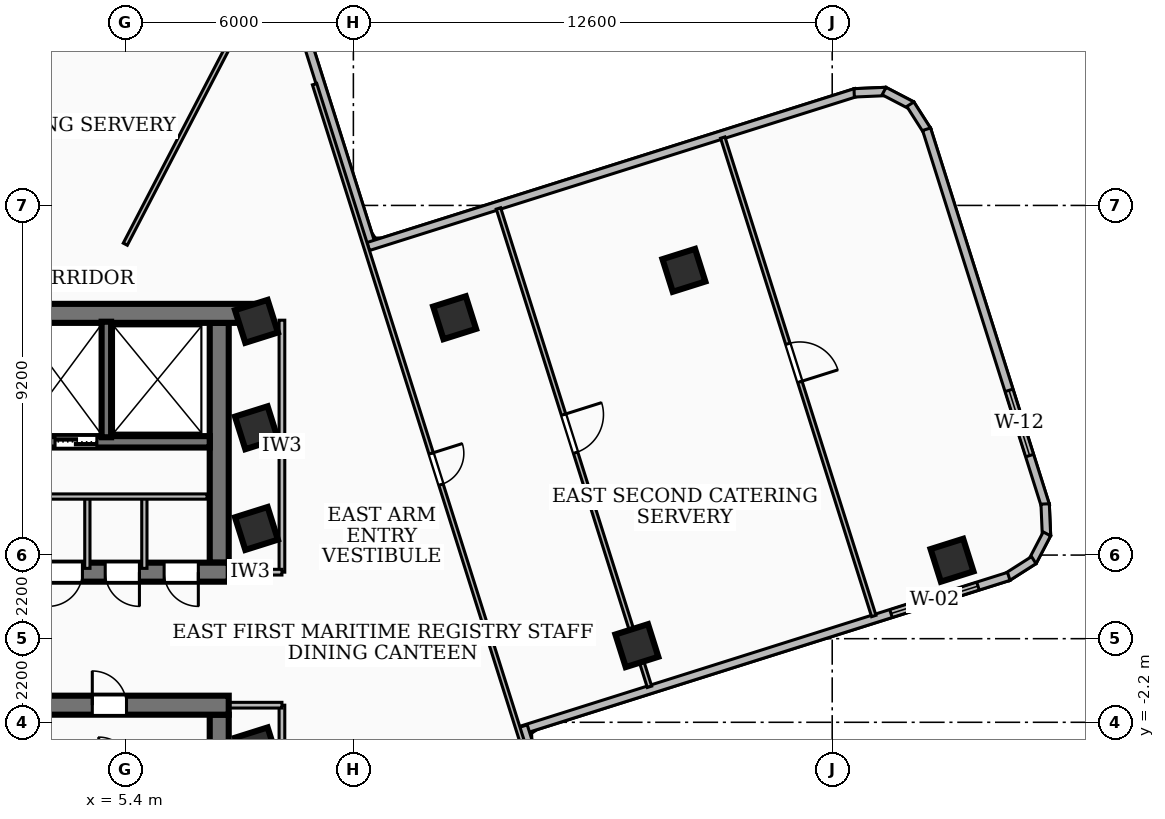
"""IFC4 building model, lengths in metres.
Left out: names, types, materials, properties, quantities, classifications, styles, units other than length and angle.
Written with IfcOpenShell. Run it as: python <this file> out.ifc"""

import sys

from ifc_helpers import new_model, si_unit, direction, frame, frame_2d, origin, origin_2d, place, context, subcontext, project, spatial, rectangle, extrude, element, fill, save


model = new_model("IFC4")
c1 = context("Model", 3, precision=1e-05, world=origin(), true_north=direction((0.0, 1.0)))
c2 = subcontext(c1, "Body", "Model", "MODEL_VIEW")
j1 = project(units=[si_unit("LENGTHUNIT", "METRE"), si_unit("PLANEANGLEUNIT", "RADIAN")], contexts=[c1])
p1 = place(None, origin())
s1 = spatial("IfcSite", under=j1, at=p1, CompositionType="ELEMENT")
p2 = place(p1, origin())
s2 = spatial("IfcBuilding", under=s1, at=p2, CompositionType="ELEMENT")
p3 = place(p2, frame((0.0, 0.0, 152.28)))
s3 = spatial("IfcBuildingStorey", under=s2, at=p3, CompositionType="ELEMENT", Elevation=152.28)
p4 = place(p3, frame((-8.78, 8.56, 0.0), z_axis=(0.0, 0.0, 1.0), x_axis=(1.0, 0.0, 0.0)))
e1 = element("IfcWall", 1, at=p4, inside=s3, PredefinedType="SHEAR", context=c2, shape_type="SweptSolid", body=[
    extrude(rectangle(XDim=17.56, YDim=0.5, at=frame_2d((8.78, 0.0))), origin(), (0.0, 0.0, 1.0), 3.34),
])
p5 = place(p3, frame((8.12, 1.75, 0.0), z_axis=(0.0, 0.0, 1.0), x_axis=(-1.0, 0.0, 0.0)))
e2 = element("IfcWall", 2, at=p5, inside=s3, PredefinedType="SHEAR", context=c2, shape_type="SweptSolid", body=[
    extrude(rectangle(XDim=16.24, YDim=0.5, at=frame_2d((8.12, 0.0))), origin(), (0.0, 0.0, 1.0), 3.34),
])
p6 = place(p5, frame((7.45, 0.0, 0.0)))
e3 = element("IfcOpeningElement", 3, at=p6, cuts=e2, PredefinedType="OPENING", context=c2, shape_type="SweptSolid", body=[
    extrude(rectangle(XDim=1.0, YDim=2.1, at=frame_2d((0.5, 1.05))), frame((0.0, 0.26, 0.0), z_axis=(0.0, -1.0, 0.0), x_axis=(1.0, 0.0, 0.0)), (0.0, 0.0, 1.0), 0.52),
])
p7 = place(p5, frame((3.85, 0.0, 0.0)))
e4 = element("IfcOpeningElement", 4, at=p7, cuts=e2, PredefinedType="OPENING", context=c2, shape_type="SweptSolid", body=[
    extrude(rectangle(XDim=0.9, YDim=2.06, at=frame_2d((0.45, 1.03))), frame((0.0, 0.26, 0.0), z_axis=(0.0, -1.0, 0.0), x_axis=(1.0, 0.0, 0.0)), (0.0, 0.0, 1.0), 0.52),
])
p8 = place(p5, frame((2.35, 0.0, 0.0)))
e5 = element("IfcOpeningElement", 5, at=p8, cuts=e2, PredefinedType="OPENING", context=c2, shape_type="SweptSolid", body=[
    extrude(rectangle(XDim=0.9, YDim=2.06, at=frame_2d((0.45, 1.03))), frame((0.0, 0.26, 0.0), z_axis=(0.0, -1.0, 0.0), x_axis=(1.0, 0.0, 0.0)), (0.0, 0.0, 1.0), 0.52),
])
p9 = place(p5, frame((0.8, 0.0, 0.0)))
e6 = element("IfcOpeningElement", 6, at=p9, cuts=e2, PredefinedType="OPENING", context=c2, shape_type="SweptSolid", body=[
    extrude(rectangle(XDim=0.9, YDim=2.06, at=frame_2d((0.45, 1.03))), frame((0.0, 0.26, 0.0), z_axis=(0.0, -1.0, 0.0), x_axis=(1.0, 0.0, 0.0)), (0.0, 0.0, 1.0), 0.52),
])
p10 = place(p3, frame((7.87, 8.31, 0.0), z_axis=(0.0, 0.0, 1.0), x_axis=(0.0, -1.0, 0.0)))
e7 = element("IfcWall", 7, at=p10, inside=s3, PredefinedType="SHEAR", context=c2, shape_type="SweptSolid", body=[
    extrude(rectangle(XDim=6.31, YDim=0.5, at=frame_2d((3.155, 0.0))), origin(), (0.0, 0.0, 1.0), 3.34),
])
p11 = place(p3, frame((7.62, 5.18, 0.0), z_axis=(0.0, 0.0, 1.0), x_axis=(-1.0, 0.0, 0.0)))
e8 = element("IfcWall", 8, at=p11, inside=s3, PredefinedType="SOLIDWALL", context=c2, shape_type="SweptSolid", body=[
    extrude(rectangle(XDim=15.24, YDim=0.3, at=frame_2d((7.62, 0.0))), origin(), (0.0, 0.0, 1.0), 3.34),
])
p12 = place(p11, frame((5.77, 0.0, 0.0)))
e9 = element("IfcOpeningElement", 9, at=p12, cuts=e8, PredefinedType="OPENING", context=c2, shape_type="SweptSolid", body=[
    extrude(rectangle(XDim=1.1, YDim=2.15, at=frame_2d((0.55, 1.075))), frame((0.0, 0.16, 0.0), z_axis=(0.0, -1.0, 0.0), x_axis=(1.0, 0.0, 0.0)), (0.0, 0.0, 1.0), 0.32),
])
p13 = place(p11, frame((2.97, 0.0, 0.0)))
e10 = element("IfcOpeningElement", 10, at=p13, cuts=e8, PredefinedType="OPENING", context=c2, shape_type="SweptSolid", body=[
    extrude(rectangle(XDim=1.1, YDim=2.15, at=frame_2d((0.55, 1.075))), frame((0.0, 0.16, 0.0), z_axis=(0.0, -1.0, 0.0), x_axis=(1.0, 0.0, 0.0)), (0.0, 0.0, 1.0), 0.32),
])
p14 = place(p11, frame((7.97, 0.0, 0.0)))
e11 = element("IfcOpeningElement", 11, at=p14, cuts=e8, PredefinedType="OPENING", context=c2, shape_type="SweptSolid", body=[
    extrude(rectangle(XDim=1.0, YDim=2.1, at=frame_2d((0.5, 1.05))), frame((0.0, 0.16, 0.0), z_axis=(0.0, -1.0, 0.0), x_axis=(1.0, 0.0, 0.0)), (0.0, 0.0, 1.0), 0.32),
])
p15 = place(p3, frame((-8.12, -1.75, 0.0), z_axis=(0.0, 0.0, 1.0), x_axis=(1.0, 0.0, 0.0)))
e12 = element("IfcWall", 12, at=p15, inside=s3, PredefinedType="SHEAR", context=c2, shape_type="SweptSolid", body=[
    extrude(rectangle(XDim=16.24, YDim=0.5, at=frame_2d((8.12, 0.0))), origin(), (0.0, 0.0, 1.0), 3.34),
])
p16 = place(p15, frame((7.45, 0.0, 0.0)))
e13 = element("IfcOpeningElement", 13, at=p16, cuts=e12, PredefinedType="OPENING", context=c2, shape_type="SweptSolid", body=[
    extrude(rectangle(XDim=1.0, YDim=2.1, at=frame_2d((0.5, 1.05))), frame((0.0, 0.26, 0.0), z_axis=(0.0, -1.0, 0.0), x_axis=(1.0, 0.0, 0.0)), (0.0, 0.0, 1.0), 0.52),
])
p17 = place(p15, frame((12.65, 0.0, 0.0)))
e14 = element("IfcOpeningElement", 14, at=p17, cuts=e12, PredefinedType="OPENING", context=c2, shape_type="SweptSolid", body=[
    extrude(rectangle(XDim=0.9, YDim=2.06, at=frame_2d((0.45, 1.03))), frame((0.0, 0.26, 0.0), z_axis=(0.0, -1.0, 0.0), x_axis=(1.0, 0.0, 0.0)), (0.0, 0.0, 1.0), 0.52),
])
p18 = place(p15, frame((0.565, 0.0, 0.0)))
e15 = element("IfcOpeningElement", 15, at=p18, cuts=e12, PredefinedType="OPENING", context=c2, shape_type="SweptSolid", body=[
    extrude(rectangle(XDim=1.05, YDim=2.15, at=frame_2d((0.525, 1.075))), frame((0.0, 0.26, 0.0), z_axis=(0.0, -1.0, 0.0), x_axis=(1.0, 0.0, 0.0)), (0.0, 0.0, 1.0), 0.52),
])
p19 = place(p15, frame((2.125, 0.0, 0.0)))
e16 = element("IfcOpeningElement", 16, at=p19, cuts=e12, PredefinedType="OPENING", context=c2, shape_type="SweptSolid", body=[
    extrude(rectangle(XDim=1.05, YDim=2.15, at=frame_2d((0.525, 1.075))), frame((0.0, 0.26, 0.0), z_axis=(0.0, -1.0, 0.0), x_axis=(1.0, 0.0, 0.0)), (0.0, 0.0, 1.0), 0.52),
])
p20 = place(p15, frame((3.685, 0.0, 0.0)))
e17 = element("IfcOpeningElement", 17, at=p20, cuts=e12, PredefinedType="OPENING", context=c2, shape_type="SweptSolid", body=[
    extrude(rectangle(XDim=1.05, YDim=2.15, at=frame_2d((0.525, 1.075))), frame((0.0, 0.26, 0.0), z_axis=(0.0, -1.0, 0.0), x_axis=(1.0, 0.0, 0.0)), (0.0, 0.0, 1.0), 0.52),
])
p21 = place(p3, frame((7.87, -2.0, 0.0), z_axis=(0.0, 0.0, 1.0), x_axis=(0.0, -1.0, 0.0)))
e18 = element("IfcWall", 18, at=p21, inside=s3, PredefinedType="SHEAR", context=c2, shape_type="SweptSolid", body=[
    extrude(rectangle(XDim=6.31, YDim=0.5, at=frame_2d((3.155, 0.0))), origin(), (0.0, 0.0, 1.0), 3.34),
])
p22 = place(p3, frame((4.9, 5.3, 0.0), z_axis=(0.0, 0.0, 1.0), x_axis=(0.0, 1.0, 0.0)))
e19 = element("IfcWall", 19, at=p22, inside=s3, PredefinedType="SOLIDWALL", context=c2, shape_type="SweptSolid", body=[
    extrude(rectangle(XDim=3.04, YDim=0.25, at=frame_2d((1.52, 0.0))), origin(), (0.0, 0.0, 1.0), 3.34),
])
for number, where, z_axis, x_axis in (
    (20, (8.85, -2.9, 0.0), (0.0, 0.0, 1.0), (0.954, 0.301, 0.0)),
    (21, (8.85, 2.9, 0.0), (0.0, 0.0, 1.0), (0.954, 0.301, 0.0)),
    (22, (8.85, 5.55, 0.0), (0.0, 0.0, 1.0), (0.954, 0.301, 0.0)),
    (23, (8.85, 8.35, 0.0), (0.0, 0.0, 1.0), (0.954, 0.301, 0.0)),
    (24, (18.86, -0.183, 0.0), (0.0, 0.0, 1.0), (0.954, 0.301, 0.0)),
    (25, (14.064, 8.445, 0.0), (0.0, 0.0, 1.0), (0.954, 0.301, 0.0)),
    (26, (27.153, 2.064, 0.0), (0.0, 0.0, 1.0), (0.954, 0.301, 0.0)),
    (27, (20.098, 9.692, 0.0), (0.0, 0.0, 1.0), (0.954, 0.301, 0.0)),
):
    element("IfcColumn", number, at=place(p3, frame(where, z_axis=z_axis, x_axis=x_axis)), inside=s3, PredefinedType="COLUMN", context=c2, shape_type="SweptSolid", body=[
        extrude(rectangle(XDim=0.9, YDim=0.9, at=origin_2d()), origin(), (0.0, 0.0, 1.0), 3.6),
    ])
p23 = place(p3, frame((9.868, 16.706, 0.0), z_axis=(0.0, 0.0, 1.0), x_axis=(0.300982683852, -0.953629605256, 0.0)))
e28 = element("IfcWall", 28, at=p23, inside=s3, PredefinedType="SOLIDWALL", context=c2, shape_type="SweptSolid", body=[
    extrude(rectangle(XDim=6.759, YDim=0.22, at=frame_2d((3.379, 0.0))), origin(), (0.0, 0.0, 1.0), 2.152),
])
p24 = place(p3, frame((11.792, 10.319, 0.0), z_axis=(0.0, 0.0, 1.0), x_axis=(0.953607060649, 0.301054104573, 0.0)))
e29 = element("IfcWall", 29, at=p24, inside=s3, PredefinedType="SOLIDWALL", context=c2, shape_type="SweptSolid", body=[
    extrude(rectangle(XDim=13.459, YDim=0.22, at=frame_2d((6.73, 0.0))), origin(), (0.0, 0.0, 1.0), 2.152),
])
p25 = place(p3, frame((24.578, 14.362, 0.0), z_axis=(0.0, 0.0, 1.0), x_axis=(0.999075913973, 0.042980438793, 0.0)))
e30 = element("IfcWall", 30, at=p25, inside=s3, PredefinedType="SOLIDWALL", context=c2, shape_type="SweptSolid", body=[
    extrude(rectangle(XDim=0.835, YDim=0.22, at=frame_2d((0.417, 0.0))), origin(), (0.0, 0.0, 1.0), 3.34),
])
p26 = place(p3, frame((25.365, 14.409, 0.0), z_axis=(0.0, 0.0, 1.0), x_axis=(0.886542320322, -0.462647505427, 0.0)))
e31 = element("IfcWall", 31, at=p26, inside=s3, PredefinedType="SOLIDWALL", context=c2, shape_type="SweptSolid", body=[
    extrude(rectangle(XDim=0.819, YDim=0.22, at=frame_2d((0.41, 0.0))), origin(), (0.0, 0.0, 1.0), 3.34),
])
p27 = place(p3, frame((26.056, 14.063, 0.0), z_axis=(0.0, 0.0, 1.0), x_axis=(0.537481840432, -0.843275323489, 0.0)))
e32 = element("IfcWall", 32, at=p27, inside=s3, PredefinedType="SOLIDWALL", context=c2, shape_type="SweptSolid", body=[
    extrude(rectangle(XDim=0.833, YDim=0.22, at=frame_2d((0.417, 0.0))), origin(), (0.0, 0.0, 1.0), 3.34),
])
p28 = place(p3, frame((26.483, 13.405, 0.0), z_axis=(0.0, 0.0, 1.0), x_axis=(0.301132492372, -0.953582310049, 0.0)))
e33 = element("IfcWall", 33, at=p28, inside=s3, PredefinedType="SOLIDWALL", context=c2, shape_type="SweptSolid", body=[
    extrude(rectangle(XDim=10.391, YDim=0.22, at=frame_2d((5.196, 0.0))), origin(), (0.0, 0.0, 1.0), 3.34),
])
p29 = place(p28, frame((7.205, 0.0, 0.85)))
e34 = element("IfcOpeningElement", 34, at=p29, cuts=e33, PredefinedType="OPENING", context=c2, shape_type="SweptSolid", body=[
    extrude(rectangle(XDim=1.8, YDim=1.6, at=frame_2d((0.9, 0.8))), frame((0.0, 0.12, 0.0), z_axis=(0.0, -1.0, 0.0), x_axis=(1.0, 0.0, 0.0)), (0.0, 0.0, 1.0), 0.24),
])
p30 = place(p3, frame((29.603, 3.545, 0.0), z_axis=(0.0, 0.0, 1.0), x_axis=(0.042992997635, -0.99907537361, 0.0)))
e35 = element("IfcWall", 35, at=p30, inside=s3, PredefinedType="SOLIDWALL", context=c2, shape_type="SweptSolid", body=[
    extrude(rectangle(XDim=0.835, YDim=0.22, at=frame_2d((0.417, 0.0))), origin(), (0.0, 0.0, 1.0), 3.34),
])
p31 = place(p3, frame((29.65, 2.758, 0.0), z_axis=(0.0, 0.0, 1.0), x_axis=(-0.462647505427, -0.886542320322, 0.0)))
e36 = element("IfcWall", 36, at=p31, inside=s3, PredefinedType="SOLIDWALL", context=c2, shape_type="SweptSolid", body=[
    extrude(rectangle(XDim=0.819, YDim=0.22, at=frame_2d((0.41, 0.0))), origin(), (0.0, 0.0, 1.0), 3.34),
])
p32 = place(p3, frame((29.304, 2.067, 0.0), z_axis=(0.0, 0.0, 1.0), x_axis=(-0.843275323489, -0.537481840432, 0.0)))
e37 = element("IfcWall", 37, at=p32, inside=s3, PredefinedType="SOLIDWALL", context=c2, shape_type="SweptSolid", body=[
    extrude(rectangle(XDim=0.833, YDim=0.22, at=frame_2d((0.417, 0.0))), origin(), (0.0, 0.0, 1.0), 3.34),
])
p33 = place(p3, frame((28.646, 1.64, 0.0), z_axis=(0.0, 0.0, 1.0), x_axis=(-0.953626521982, -0.300992452685, 0.0)))
e38 = element("IfcWall", 38, at=p33, inside=s3, PredefinedType="SOLIDWALL", context=c2, shape_type="SweptSolid", body=[
    extrude(rectangle(XDim=13.458, YDim=0.22, at=frame_2d((6.729, 0.0))), origin(), (0.0, 0.0, 1.0), 3.34),
])
p34 = place(p33, frame((0.85, 0.0, 0.85)))
e39 = element("IfcOpeningElement", 39, at=p34, cuts=e38, PredefinedType="OPENING", context=c2, shape_type="SweptSolid", body=[
    extrude(rectangle(XDim=2.4, YDim=2.1, at=frame_2d((1.2, 1.05))), frame((0.0, 0.12, 0.0), z_axis=(0.0, -1.0, 0.0), x_axis=(1.0, 0.0, 0.0)), (0.0, 0.0, 1.0), 0.24),
])
p35 = place(p3, frame((15.87, -2.301, 0.0), z_axis=(0.0, 0.0, 1.0), x_axis=(0.300910882413, -0.953652264112, 0.0)))
e40 = element("IfcWall", 40, at=p35, inside=s3, PredefinedType="SOLIDWALL", context=c2, shape_type="SweptSolid", body=[
    extrude(rectangle(XDim=5.989, YDim=0.22, at=frame_2d((2.994, 0.0))), origin(), (0.0, 0.0, 1.0), 3.34),
])
p36 = place(p3, frame((2.9, 3.74, 0.0), z_axis=(0.0, 0.0, 1.0), x_axis=(1.0, 0.0, 0.0)))
e41 = element("IfcWall", 41, at=p36, inside=s3, PredefinedType="PARTITIONING", context=c2, shape_type="SweptSolid", body=[
    extrude(rectangle(XDim=4.65, YDim=0.138, at=frame_2d((2.325, 0.0))), origin(), (0.0, 0.0, 1.0), 3.34),
])
for number, where, z_axis, x_axis in (
    (42, (4.4, 1.85, 0.0), (0.0, 0.0, 1.0), (0.0, 1.0, 0.0)),
    (43, (5.9, 1.85, 0.0), (0.0, 0.0, 1.0), (0.0, 1.0, 0.0)),
):
    element("IfcWall", number, at=place(p3, frame(where, z_axis=z_axis, x_axis=x_axis)), inside=s3, PredefinedType="PARTITIONING", context=c2, shape_type="SweptSolid", body=[
        extrude(rectangle(XDim=1.89, YDim=0.138, at=frame_2d((0.945, 0.0))), origin(), (0.0, 0.0, 1.0), 2.57),
    ])
p37 = place(p3, frame((9.52, 1.75, 0.0), z_axis=(0.0, 0.0, 1.0), x_axis=(0.0, 1.0, 0.0)))
e44 = element("IfcWall", 44, at=p37, inside=s3, PredefinedType="PARTITIONING", context=c2, shape_type="SweptSolid", body=[
    extrude(rectangle(XDim=6.63, YDim=0.15, at=frame_2d((3.315, 0.0))), origin(), (0.0, 0.0, 1.0), 2.152),
])
p38 = place(p3, frame((7.85, 1.75, 0.0), z_axis=(0.0, 0.0, 1.0), x_axis=(1.0, 0.0, 0.0)))
e45 = element("IfcWall", 45, at=p38, inside=s3, PredefinedType="PARTITIONING", context=c2, shape_type="SweptSolid", body=[
    extrude(rectangle(XDim=1.67, YDim=0.15, at=frame_2d((0.835, 0.0))), origin(), (0.0, 0.0, 1.0), 2.57),
])
p39 = place(p3, frame((9.52, -8.38, 0.0), z_axis=(0.0, 0.0, 1.0), x_axis=(0.0, 1.0, 0.0)))
e46 = element("IfcWall", 46, at=p39, inside=s3, PredefinedType="PARTITIONING", context=c2, shape_type="SweptSolid", body=[
    extrude(rectangle(XDim=6.63, YDim=0.15, at=frame_2d((3.315, 0.0))), origin(), (0.0, 0.0, 1.0), 2.152),
])
p40 = place(p3, frame((7.85, -1.75, 0.0), z_axis=(0.0, 0.0, 1.0), x_axis=(1.0, 0.0, 0.0)))
e47 = element("IfcWall", 47, at=p40, inside=s3, PredefinedType="PARTITIONING", context=c2, shape_type="SweptSolid", body=[
    extrude(rectangle(XDim=1.67, YDim=0.15, at=frame_2d((0.835, 0.0))), origin(), (0.0, 0.0, 1.0), 2.57),
])
p41 = place(p3, frame((5.398, 10.38, 0.0), z_axis=(0.0, 0.0, 1.0), x_axis=(0.461434665806, 0.887174193263, 0.0)))
e48 = element("IfcWall", 48, at=p41, inside=s3, PredefinedType="PARTITIONING", context=c2, shape_type="SweptSolid", body=[
    extrude(rectangle(XDim=7.975, YDim=0.12, at=frame_2d((3.988, 0.0))), origin(), (0.0, 0.0, 1.0), 2.152),
])
p42 = place(p3, frame((10.379, 14.591, 0.0), z_axis=(0.0, 0.0, 1.0), x_axis=(0.301070726534, -0.95360181293, 0.0)))
e49 = element("IfcWall", 49, at=p42, inside=s3, PredefinedType="PARTITIONING", context=c2, shape_type="SweptSolid", body=[
    extrude(rectangle(XDim=20.81, YDim=0.12, at=frame_2d((10.405, 0.0))), origin(), (0.0, 0.0, 1.0), 2.152),
])
p43 = place(p42, frame((10.189, 0.0, 0.0)))
e50 = element("IfcOpeningElement", 50, at=p43, cuts=e49, PredefinedType="OPENING", context=c2, shape_type="SweptSolid", body=[
    extrude(rectangle(XDim=0.86, YDim=2.0, at=frame_2d((0.43, 1.0))), frame((0.0, 0.07, 0.0), z_axis=(0.0, -1.0, 0.0), x_axis=(1.0, 0.0, 0.0)), (0.0, 0.0, 1.0), 0.14),
])
p44 = place(p3, frame((15.218, 11.321, 0.0), z_axis=(0.0, 0.0, 1.0), x_axis=(0.301061435932, -0.953604746105, 0.0)))
e51 = element("IfcWall", 51, at=p44, inside=s3, PredefinedType="PARTITIONING", context=c2, shape_type="SweptSolid", body=[
    extrude(rectangle(XDim=13.199, YDim=0.12, at=frame_2d((6.6, 0.0))), origin(), (0.0, 0.0, 1.0), 2.152),
])
p45 = place(p44, frame((5.69, 0.0, 0.0)))
e52 = element("IfcOpeningElement", 52, at=p45, cuts=e51, PredefinedType="OPENING", context=c2, shape_type="SweptSolid", body=[
    extrude(rectangle(XDim=1.05, YDim=2.08, at=frame_2d((0.525, 1.04))), frame((0.0, 0.07, 0.0), z_axis=(0.0, -1.0, 0.0), x_axis=(1.0, 0.0, 0.0)), (0.0, 0.0, 1.0), 0.14),
])
p46 = place(p3, frame((21.12, 13.185, 0.0), z_axis=(0.0, 0.0, 1.0), x_axis=(0.301040196878, -0.953611451202, 0.0)))
e53 = element("IfcWall", 53, at=p46, inside=s3, PredefinedType="PARTITIONING", context=c2, shape_type="SweptSolid", body=[
    extrude(rectangle(XDim=13.2, YDim=0.12, at=frame_2d((6.6, 0.0))), origin(), (0.0, 0.0, 1.0), 2.152),
])
p47 = place(p46, frame((5.69, 0.0, 0.0)))
e54 = element("IfcOpeningElement", 54, at=p47, cuts=e53, PredefinedType="OPENING", context=c2, shape_type="SweptSolid", body=[
    extrude(rectangle(XDim=1.05, YDim=2.08, at=frame_2d((0.525, 1.04))), frame((0.0, 0.07, 0.0), z_axis=(0.0, -1.0, 0.0), x_axis=(1.0, 0.0, 0.0)), (0.0, 0.0, 1.0), 0.14),
])
p48 = place(p3, frame((-14.591, 10.379, 0.0), z_axis=(0.0, 0.0, 1.0), x_axis=(0.95360181293, 0.301070726534, 0.0)))
e55 = element("IfcWall", 55, at=p48, inside=s3, PredefinedType="PARTITIONING", context=c2, shape_type="SweptSolid", body=[
    extrude(rectangle(XDim=20.81, YDim=0.12, at=frame_2d((10.405, 0.0))), origin(), (0.0, 0.0, 1.0), 2.152),
])
p49 = place(p48, frame((10.189, 0.0, 0.0)))
e56 = element("IfcOpeningElement", 56, at=p49, cuts=e55, PredefinedType="OPENING", context=c2, shape_type="SweptSolid", body=[
    extrude(rectangle(XDim=0.86, YDim=2.0, at=frame_2d((0.43, 1.0))), frame((0.0, 0.07, 0.0), z_axis=(0.0, -1.0, 0.0), x_axis=(1.0, 0.0, 0.0)), (0.0, 0.0, 1.0), 0.14),
])
p50 = place(p29, origin())
e57 = element("IfcWindow", 57, at=p50, inside=s3, PartitioningType="SINGLE_PANEL", PredefinedType="WINDOW", context=c2, shape_type="SweptSolid", body=[
    extrude(rectangle(XDim=1.8, YDim=1.6, at=frame_2d((0.9, 0.8))), frame((0.0, 0.03, 0.0), z_axis=(0.0, -1.0, 0.0), x_axis=(1.0, 0.0, 0.0)), (0.0, 0.0, 1.0), 0.06),
])
fill(e34, e57)
p51 = place(p34, origin())
e58 = element("IfcWindow", 58, at=p51, inside=s3, PartitioningType="SINGLE_PANEL", PredefinedType="WINDOW", context=c2, shape_type="SweptSolid", body=[
    extrude(rectangle(XDim=2.4, YDim=2.1, at=frame_2d((1.2, 1.05))), frame((0.0, 0.03, 0.0), z_axis=(0.0, -1.0, 0.0), x_axis=(1.0, 0.0, 0.0)), (0.0, 0.0, 1.0), 0.06),
])
fill(e39, e58)
p52 = place(p13, origin())
e59 = element("IfcDoor", 59, at=p52, inside=s3, OperationType="DOUBLE_DOOR_SLIDING", PredefinedType="DOOR", context=c2, shape_type="SweptSolid", body=[
    extrude(rectangle(XDim=1.1, YDim=2.15, at=frame_2d((0.55, 1.075))), frame((0.0, 0.025, 0.0), z_axis=(0.0, -1.0, 0.0), x_axis=(1.0, 0.0, 0.0)), (0.0, 0.0, 1.0), 0.05),
])
fill(e10, e59)
p53 = place(p17, origin())
e60 = element("IfcDoor", 60, at=p53, inside=s3, OperationType="SINGLE_SWING_LEFT", PredefinedType="DOOR", context=c2, shape_type="SweptSolid", body=[
    extrude(rectangle(XDim=0.9, YDim=2.06, at=frame_2d((0.45, 1.03))), frame((0.0, 0.025, 0.0), z_axis=(0.0, -1.0, 0.0), x_axis=(1.0, 0.0, 0.0)), (0.0, 0.0, 1.0), 0.05),
])
fill(e14, e60)
p54 = place(p7, origin())
e61 = element("IfcDoor", 61, at=p54, inside=s3, OperationType="SINGLE_SWING_RIGHT", PredefinedType="DOOR", context=c2, shape_type="SweptSolid", body=[
    extrude(rectangle(XDim=0.9, YDim=2.06, at=frame_2d((0.45, 1.03))), frame((0.0, 0.025, 0.0), z_axis=(0.0, -1.0, 0.0), x_axis=(1.0, 0.0, 0.0)), (0.0, 0.0, 1.0), 0.05),
])
fill(e4, e61)
p55 = place(p8, origin())
e62 = element("IfcDoor", 62, at=p55, inside=s3, OperationType="SINGLE_SWING_LEFT", PredefinedType="DOOR", context=c2, shape_type="SweptSolid", body=[
    extrude(rectangle(XDim=0.9, YDim=2.06, at=frame_2d((0.45, 1.03))), frame((0.0, 0.025, 0.0), z_axis=(0.0, -1.0, 0.0), x_axis=(1.0, 0.0, 0.0)), (0.0, 0.0, 1.0), 0.05),
])
fill(e5, e62)
p56 = place(p9, origin())
e63 = element("IfcDoor", 63, at=p56, inside=s3, OperationType="SINGLE_SWING_LEFT", PredefinedType="DOOR", context=c2, shape_type="SweptSolid", body=[
    extrude(rectangle(XDim=0.9, YDim=2.06, at=frame_2d((0.45, 1.03))), frame((0.0, 0.025, 0.0), z_axis=(0.0, -1.0, 0.0), x_axis=(1.0, 0.0, 0.0)), (0.0, 0.0, 1.0), 0.05),
])
fill(e6, e63)
p57 = place(p43, origin())
e64 = element("IfcDoor", 64, at=p57, inside=s3, OperationType="SINGLE_SWING_LEFT", PredefinedType="DOOR", context=c2, shape_type="SweptSolid", body=[
    extrude(rectangle(XDim=0.86, YDim=2.0, at=frame_2d((0.43, 1.0))), frame((0.0, 0.025, 0.0), z_axis=(0.0, -1.0, 0.0), x_axis=(1.0, 0.0, 0.0)), (0.0, 0.0, 1.0), 0.05),
])
fill(e50, e64)
p58 = place(p45, origin())
e65 = element("IfcDoor", 65, at=p58, inside=s3, OperationType="SINGLE_SWING_LEFT", PredefinedType="DOOR", context=c2, shape_type="SweptSolid", body=[
    extrude(rectangle(XDim=1.05, YDim=2.08, at=frame_2d((0.525, 1.04))), frame((0.0, 0.025, 0.0), z_axis=(0.0, -1.0, 0.0), x_axis=(1.0, 0.0, 0.0)), (0.0, 0.0, 1.0), 0.05),
])
fill(e52, e65)
p59 = place(p47, origin())
e66 = element("IfcDoor", 66, at=p59, inside=s3, OperationType="SINGLE_SWING_RIGHT", PredefinedType="DOOR", context=c2, shape_type="SweptSolid", body=[
    extrude(rectangle(XDim=1.05, YDim=2.08, at=frame_2d((0.525, 1.04))), frame((0.0, 0.025, 0.0), z_axis=(0.0, -1.0, 0.0), x_axis=(1.0, 0.0, 0.0)), (0.0, 0.0, 1.0), 0.05),
])
fill(e54, e66)
save(model, sys.argv[1])
